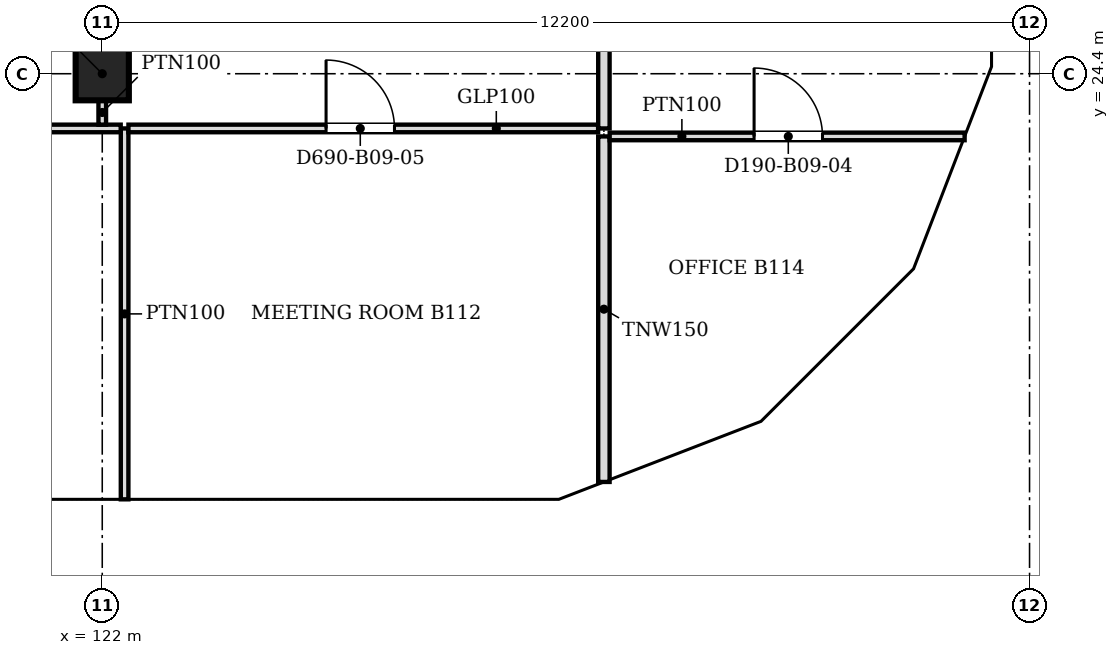
"""IFC4 building model, lengths in metres.
Left out: names, types, materials, properties, quantities, classifications, styles, units other than length and angle.
Written with IfcOpenShell. Run it as: python <this file> out.ifc"""

import sys

from ifc_helpers import new_model, si_unit, direction, frame, frame_2d, origin, origin_2d, place, context, subcontext, project, spatial, polyline, rectangle, outline, extrude, faceted_brep, source, transform, mapped, element, fill, save


model = new_model("IFC4")
c1 = context("Model", 3, precision=1e-05, world=origin(), true_north=direction((0.0, 1.0)))
c2 = subcontext(c1, "Body", "Model", "MODEL_VIEW")
j1 = project(units=[si_unit("LENGTHUNIT", "METRE"), si_unit("PLANEANGLEUNIT", "RADIAN")], contexts=[c1])
p1 = place(None, origin())
s1 = spatial("IfcSite", under=j1, at=p1, CompositionType="ELEMENT")
p2 = place(p1, origin())
s2 = spatial("IfcBuilding", under=s1, at=p2, CompositionType="ELEMENT")
p3 = place(p2, frame((0.0, 0.0, 87.6)))
s3 = spatial("IfcBuildingStorey", under=s2, at=p3, CompositionType="ELEMENT", Elevation=87.6)
p4 = place(p3, frame((122.0, 24.4, 0.0), z_axis=(0.0, 0.0, 1.0), x_axis=(1.0, 0.0, 0.0)))
e1 = element("IfcColumn", 1, at=p4, inside=s3, PredefinedType="COLUMN", context=c2, shape_type="SweptSolid", body=[
    extrude(rectangle(XDim=0.7, YDim=0.7, at=origin_2d()), origin(), (0.0, 0.0, 1.0), 3.6),
])
m1 = source(origin(), c2, "Body", "SweptSolid", [
    extrude(outline(polyline([(3.05, 0.0), (6.1, 3.8), (3.05, 7.6), (0.0, 3.8), (3.05, 0.0)])), frame((0.0, 0.25, 0.0), z_axis=(0.0, -1.0, 0.0), x_axis=(1.0, 0.0, 0.0)), (0.0, 0.0, 1.0), 0.5),
])
p5 = place(p3, frame((115.9, 18.55, -3.8), z_axis=(0.0, 0.0, 1.0), x_axis=(1.0, 0.0, 0.0)))
e2 = element("IfcWall", 2, at=p5, inside=s3, PredefinedType="SOLIDWALL", context=c2, shape_type="MappedRepresentation", body=[
    mapped(m1, transform((0.0, 0.0, 0.0), scale=1.0)),
])
m2 = source(origin(), c2, "Body", "SweptSolid", [
    extrude(outline(polyline([(3.05, 0.399), (5.78, 3.8), (3.05, 7.2), (0.321, 3.8), (3.05, 0.399)])), frame((0.0, 0.26, 0.0), z_axis=(0.0, -1.0, 0.0), x_axis=(1.0, 0.0, 0.0)), (0.0, 0.0, 1.0), 0.52),
])
p6 = place(p5, origin())
e3 = element("IfcOpeningElement", 3, at=p6, cuts=e2, PredefinedType="OPENING", context=c2, shape_type="MappedRepresentation", body=[
    mapped(m2, transform((0.0, 0.0, 0.0), scale=1.0)),
])
m3 = source(origin(), c2, "Body", "Brep", [
    faceted_brep([(3.05, -0.25, 0.0), (6.053, -0.25, 3.8), (3.05, -0.25, 7.6), (0.0, -0.25, 3.8), (0.0, 0.25, 3.8), (3.05, 0.25, 7.6), (6.007, 0.25, 3.859), (6.007, 0.25, 3.741), (3.05, 0.25, 0.0), (6.053, 0.0, 3.8)], [[[0, 1, 2, 3]], [[4, 5, 6, 7, 8]], [[8, 7, 9, 1, 0]], [[6, 5, 2, 1, 9]], [[5, 4, 3, 2]], [[4, 8, 0, 3]], [[7, 6, 9]]]),
])
p7 = place(p3, frame((122.0, 18.55, -3.8), z_axis=(0.0, 0.0, 1.0), x_axis=(1.0, 0.0, 0.0)))
e4 = element("IfcWall", 4, at=p7, inside=s3, PredefinedType="SOLIDWALL", context=c2, shape_type="MappedRepresentation", body=[
    mapped(m3, transform((0.0, 0.0, 0.0), scale=1.0)),
])
m4 = source(origin(), c2, "Body", "SweptSolid", [
    extrude(outline(polyline([(3.049, 0.401), (5.735, 3.8), (3.049, 7.199), (0.321, 3.8), (3.049, 0.401)])), frame((0.0, 0.26, 0.0), z_axis=(0.0, -1.0, 0.0), x_axis=(1.0, 0.0, 0.0)), (0.0, 0.0, 1.0), 0.52),
])
p8 = place(p7, origin())
e5 = element("IfcOpeningElement", 5, at=p8, cuts=e4, PredefinedType="OPENING", context=c2, shape_type="MappedRepresentation", body=[
    mapped(m4, transform((0.0, 0.0, 0.0), scale=1.0)),
])
m5 = source(origin(), c2, "Body", "Brep", [
    faceted_brep([(2.95, -0.25, 0.0), (3.003, -0.25, 0.068), (3.003, -0.25, 7.531), (2.95, -0.25, 7.6), (0.0, -0.25, 3.8), (0.047, 0.25, 3.86), (2.898, 0.25, 7.532), (2.898, 0.25, 0.068), (0.047, 0.25, 3.74), (2.95, 0.0, 0.0), (2.95, 0.0, 7.6), (0.0, 0.0, 3.8)], [[[0, 1, 2, 3, 4]], [[5, 6, 7, 8]], [[1, 0, 9]], [[10, 3, 2]], [[6, 5, 11, 4, 3, 10]], [[8, 7, 9, 0, 4, 11]], [[8, 11, 5]], [[1, 9, 7, 6, 10, 2]]]),
])
p9 = place(p3, frame((128.053, 18.55, -3.8), z_axis=(0.0, 0.0, 1.0), x_axis=(0.933007896601, 0.359855894603, 0.0)))
e6 = element("IfcWall", 6, at=p9, inside=s3, PredefinedType="SOLIDWALL", context=c2, shape_type="MappedRepresentation", body=[
    mapped(m5, transform((0.0, 0.0, 0.0), scale=1.0)),
])
m6 = source(origin(), c2, "Body", "SweptSolid", [
    extrude(outline(polyline([(2.75, 6.935), (0.316, 3.8), (2.75, 0.665), (2.75, 6.935)])), frame((0.0, 0.26, 0.0), z_axis=(0.0, -1.0, 0.0), x_axis=(1.0, 0.0, 0.0)), (0.0, 0.0, 1.0), 0.52),
])
p10 = place(p9, origin())
e7 = element("IfcOpeningElement", 7, at=p10, cuts=e6, PredefinedType="OPENING", context=c2, shape_type="MappedRepresentation", body=[
    mapped(m6, transform((0.0, 0.0, 0.0), scale=1.0)),
])
m7 = source(origin(), c2, "Body", "Brep", [
    faceted_brep([(0.053, -0.25, 0.0), (2.997, -0.25, 3.8), (0.053, -0.25, 7.6), (0.0, -0.25, 7.532), (0.0, -0.25, 0.068), (0.106, 0.25, 7.531), (2.944, 0.25, 3.868), (2.944, 0.25, 3.732), (0.106, 0.25, 0.068), (2.997, 0.0, 3.8), (0.053, 0.0, 0.0), (0.053, 0.0, 7.6)], [[[0, 1, 2, 3, 4]], [[5, 6, 7, 8]], [[8, 7, 9, 1, 0, 10]], [[6, 5, 11, 2, 1, 9]], [[3, 2, 11]], [[10, 0, 4]], [[8, 10, 4, 3, 11, 5]], [[7, 6, 9]]]),
])
p11 = place(p3, frame((130.769, 19.574, -3.8), z_axis=(0.0, 0.0, 1.0), x_axis=(0.707106781187, 0.707106781187, 0.0)))
e8 = element("IfcWall", 8, at=p11, inside=s3, PredefinedType="SOLIDWALL", context=c2, shape_type="MappedRepresentation", body=[
    mapped(m7, transform((0.0, 0.0, 0.0), scale=1.0)),
])
m8 = source(origin(), c2, "Body", "SweptSolid", [
    extrude(outline(polyline([(0.253, 0.666), (2.681, 3.8), (0.253, 6.934), (0.253, 0.666)])), frame((0.0, 0.26, 0.0), z_axis=(0.0, -1.0, 0.0), x_axis=(1.0, 0.0, 0.0)), (0.0, 0.0, 1.0), 0.52),
])
p12 = place(p11, origin())
e9 = element("IfcOpeningElement", 9, at=p12, cuts=e8, PredefinedType="OPENING", context=c2, shape_type="MappedRepresentation", body=[
    mapped(m8, transform((0.0, 0.0, 0.0), scale=1.0)),
])
m9 = source(origin(), c2, "Body", "Brep", [
    faceted_brep([(2.95, -0.25, 0.0), (2.997, -0.25, 0.059), (2.997, -0.25, 7.541), (2.95, -0.25, 7.6), (0.0, -0.25, 3.8), (0.053, 0.25, 3.868), (2.904, 0.25, 7.54), (2.904, 0.25, 0.06), (0.053, 0.25, 3.732), (2.95, 0.0, 0.0), (2.95, 0.0, 7.6), (0.0, 0.0, 3.8)], [[[0, 1, 2, 3, 4]], [[5, 6, 7, 8]], [[1, 0, 9]], [[10, 3, 2]], [[6, 5, 11, 4, 3, 10]], [[8, 7, 9, 0, 4, 11]], [[8, 11, 5]], [[1, 9, 7, 6, 10, 2]]]),
])
p13 = place(p3, frame((132.888, 21.694, -3.8), z_axis=(0.0, 0.0, 1.0), x_axis=(0.359901446078, 0.932990326376, 0.0)))
e10 = element("IfcWall", 10, at=p13, inside=s3, PredefinedType="SOLIDWALL", context=c2, shape_type="MappedRepresentation", body=[
    mapped(m9, transform((0.0, 0.0, 0.0), scale=1.0)),
])
p14 = place(p13, origin())
e11 = element("IfcOpeningElement", 11, at=p14, cuts=e10, PredefinedType="OPENING", context=c2, shape_type="MappedRepresentation", body=[
    mapped(m6, transform((0.0, 0.0, 0.0), scale=1.0)),
])
m10 = source(origin(), c2, "Body", "Brep", [
    faceted_brep([(0.047, -0.25, 0.0), (3.05, -0.25, 3.8), (0.047, -0.25, 7.6), (0.0, -0.25, 7.54), (0.0, -0.25, 0.06), (0.093, 0.25, 7.541), (3.05, 0.25, 3.8), (0.093, 0.25, 0.059), (0.047, 0.0, 0.0), (0.047, 0.0, 7.6)], [[[0, 1, 2, 3, 4]], [[5, 6, 7]], [[7, 6, 1, 0, 8]], [[6, 5, 9, 2, 1]], [[3, 2, 9]], [[8, 0, 4]], [[7, 8, 4, 3, 9, 5]]]),
])
p15 = place(p3, frame((133.95, 24.4, -3.8), z_axis=(0.0, 0.0, 1.0), x_axis=(0.0, 1.0, 0.0)))
e12 = element("IfcWall", 12, at=p15, inside=s3, PredefinedType="SOLIDWALL", context=c2, shape_type="MappedRepresentation", body=[
    mapped(m10, transform((0.0, 0.0, 0.0), scale=1.0)),
])
m11 = source(origin(), c2, "Body", "SweptSolid", [
    extrude(outline(polyline([(0.247, 0.656), (2.731, 3.8), (0.247, 6.944), (0.247, 0.656)])), frame((0.0, 0.26, 0.0), z_axis=(0.0, -1.0, 0.0), x_axis=(1.0, 0.0, 0.0)), (0.0, 0.0, 1.0), 0.52),
])
p16 = place(p15, origin())
e13 = element("IfcOpeningElement", 13, at=p16, cuts=e12, PredefinedType="OPENING", context=c2, shape_type="MappedRepresentation", body=[
    mapped(m11, transform((0.0, 0.0, 0.0), scale=1.0)),
])
p17 = place(p2, frame((0.0, 0.0, 91.4)))
s4 = spatial("IfcBuildingStorey", under=s2, at=p17, CompositionType="ELEMENT", Elevation=91.4)
m12 = source(origin(), c2, "Body", "SweptSolid", [
    extrude(outline(polyline([(3.05, 0.0), (6.1, 3.8), (3.05, 7.6), (0.0, 3.8), (3.05, 0.0)])), frame((0.0, 0.25, 0.0), z_axis=(0.0, -1.0, 0.0), x_axis=(1.0, 0.0, 0.0)), (0.0, 0.0, 1.0), 0.5),
])
p18 = place(p17, frame((118.95, 18.55, -3.8), z_axis=(0.0, 0.0, 1.0), x_axis=(1.0, 0.0, 0.0)))
e14 = element("IfcWall", 14, at=p18, inside=s4, PredefinedType="SOLIDWALL", context=c2, shape_type="MappedRepresentation", body=[
    mapped(m12, transform((0.0, 0.0, 0.0), scale=1.0)),
])
m13 = source(origin(), c2, "Body", "SweptSolid", [
    extrude(outline(polyline([(3.05, 0.399), (5.78, 3.8), (3.05, 7.2), (0.321, 3.8), (3.05, 0.399)])), frame((0.0, 0.26, 0.0), z_axis=(0.0, -1.0, 0.0), x_axis=(1.0, 0.0, 0.0)), (0.0, 0.0, 1.0), 0.52),
])
p19 = place(p18, origin())
e15 = element("IfcOpeningElement", 15, at=p19, cuts=e14, PredefinedType="OPENING", context=c2, shape_type="MappedRepresentation", body=[
    mapped(m13, transform((0.0, 0.0, 0.0), scale=1.0)),
])
m14 = source(origin(), c2, "Body", "Brep", [
    faceted_brep([(3.003, -0.25, 0.0), (3.05, -0.25, 0.06), (3.05, -0.25, 7.54), (3.003, -0.25, 7.6), (0.0, -0.25, 3.8), (0.0, 0.25, 3.8), (2.957, 0.25, 7.541), (2.957, 0.25, 0.059), (3.003, 0.0, 0.0), (3.003, 0.0, 7.6)], [[[0, 1, 2, 3, 4]], [[5, 6, 7]], [[1, 0, 8]], [[9, 3, 2]], [[6, 5, 4, 3, 9]], [[5, 7, 8, 0, 4]], [[1, 8, 7, 6, 9, 2]]]),
])
p20 = place(p17, frame((125.05, 18.55, -3.8), z_axis=(0.0, 0.0, 1.0), x_axis=(1.0, 0.0, 0.0)))
e16 = element("IfcWall", 16, at=p20, inside=s4, PredefinedType="SOLIDWALL", context=c2, shape_type="MappedRepresentation", body=[
    mapped(m14, transform((0.0, 0.0, 0.0), scale=1.0)),
])
m15 = source(origin(), c2, "Body", "SweptSolid", [
    extrude(outline(polyline([(2.803, 6.944), (0.319, 3.8), (2.803, 0.656), (2.803, 6.944)])), frame((0.0, 0.26, 0.0), z_axis=(0.0, -1.0, 0.0), x_axis=(1.0, 0.0, 0.0)), (0.0, 0.0, 1.0), 0.52),
])
p21 = place(p20, origin())
e17 = element("IfcOpeningElement", 17, at=p21, cuts=e16, PredefinedType="OPENING", context=c2, shape_type="MappedRepresentation", body=[
    mapped(m15, transform((0.0, 0.0, 0.0), scale=1.0)),
])
m16 = source(origin(), c2, "Body", "Brep", [
    faceted_brep([(0.047, -0.25, 0.0), (2.997, -0.25, 3.8), (0.047, -0.25, 7.6), (0.0, -0.25, 7.541), (0.0, -0.25, 0.059), (0.093, 0.25, 7.54), (2.944, 0.25, 3.868), (2.944, 0.25, 3.732), (0.093, 0.25, 0.06), (2.997, 0.0, 3.8), (0.047, 0.0, 0.0), (0.047, 0.0, 7.6)], [[[0, 1, 2, 3, 4]], [[5, 6, 7, 8]], [[8, 7, 9, 1, 0, 10]], [[6, 5, 11, 2, 1, 9]], [[3, 2, 11]], [[10, 0, 4]], [[8, 10, 4, 3, 11, 5]], [[9, 7, 6]]]),
])
p22 = place(p17, frame((128.01, 18.533, -3.8), z_axis=(0.0, 0.0, 1.0), x_axis=(0.932990326376, 0.359901446078, 0.0)))
e18 = element("IfcWall", 18, at=p22, inside=s4, PredefinedType="SOLIDWALL", context=c2, shape_type="MappedRepresentation", body=[
    mapped(m16, transform((0.0, 0.0, 0.0), scale=1.0)),
])
m17 = source(origin(), c2, "Body", "SweptSolid", [
    extrude(outline(polyline([(0.247, 0.665), (2.681, 3.8), (0.247, 6.935), (0.247, 0.665)])), frame((0.0, 0.26, 0.0), z_axis=(0.0, -1.0, 0.0), x_axis=(1.0, 0.0, 0.0)), (0.0, 0.0, 1.0), 0.52),
])
p23 = place(p22, origin())
e19 = element("IfcOpeningElement", 19, at=p23, cuts=e18, PredefinedType="OPENING", context=c2, shape_type="MappedRepresentation", body=[
    mapped(m17, transform((0.0, 0.0, 0.0), scale=1.0)),
])
m18 = source(origin(), c2, "Body", "Brep", [
    faceted_brep([(2.944, -0.25, 0.0), (2.997, -0.25, 0.068), (2.997, -0.25, 7.532), (2.944, -0.25, 7.6), (0.0, -0.25, 3.8), (0.053, 0.25, 3.868), (2.891, 0.25, 7.532), (2.891, 0.25, 0.068), (0.053, 0.25, 3.731), (2.944, 0.0, 0.0), (2.944, 0.0, 7.6), (0.0, 0.0, 3.8)], [[[0, 1, 2, 3, 4]], [[5, 6, 7, 8]], [[1, 0, 9]], [[10, 3, 2]], [[6, 5, 11, 4, 3, 10]], [[8, 7, 9, 0, 4, 11]], [[8, 11, 5]], [[1, 9, 7, 6, 10, 2]]]),
])
p24 = place(p17, frame((130.806, 19.612, -3.8), z_axis=(0.0, 0.0, 1.0), x_axis=(0.707106781187, 0.707106781187, 0.0)))
e20 = element("IfcWall", 20, at=p24, inside=s4, PredefinedType="SOLIDWALL", context=c2, shape_type="MappedRepresentation", body=[
    mapped(m18, transform((0.0, 0.0, 0.0), scale=1.0)),
])
m19 = source(origin(), c2, "Body", "SweptSolid", [
    extrude(outline(polyline([(2.744, 6.934), (0.316, 3.8), (2.744, 0.666), (2.744, 6.934)])), frame((0.0, 0.26, 0.0), z_axis=(0.0, -1.0, 0.0), x_axis=(1.0, 0.0, 0.0)), (0.0, 0.0, 1.0), 0.52),
])
p25 = place(p24, origin())
e21 = element("IfcOpeningElement", 21, at=p25, cuts=e20, PredefinedType="OPENING", context=c2, shape_type="MappedRepresentation", body=[
    mapped(m19, transform((0.0, 0.0, 0.0), scale=1.0)),
])
m20 = source(origin(), c2, "Body", "Brep", [
    faceted_brep([(0.053, -0.25, 0.0), (3.003, -0.25, 3.8), (0.053, -0.25, 7.6), (0.0, -0.25, 7.531), (0.0, -0.25, 0.068), (0.106, 0.25, 7.532), (2.957, 0.25, 3.86), (2.957, 0.25, 3.74), (0.106, 0.25, 0.068), (3.003, 0.0, 3.8), (0.053, 0.0, 0.0), (0.053, 0.0, 7.6)], [[[0, 1, 2, 3, 4]], [[5, 6, 7, 8]], [[8, 7, 9, 1, 0, 10]], [[6, 5, 11, 2, 1, 9]], [[3, 2, 11]], [[10, 0, 4]], [[8, 10, 4, 3, 11, 5]], [[9, 7, 6]]]),
])
p26 = place(p17, frame((132.869, 21.644, -3.8), z_axis=(0.0, 0.0, 1.0), x_axis=(0.359855894603, 0.933007896601, 0.0)))
e22 = element("IfcWall", 22, at=p26, inside=s4, PredefinedType="SOLIDWALL", context=c2, shape_type="MappedRepresentation", body=[
    mapped(m20, transform((0.0, 0.0, 0.0), scale=1.0)),
])
m21 = source(origin(), c2, "Body", "SweptSolid", [
    extrude(outline(polyline([(0.253, 0.665), (2.687, 3.8), (0.253, 6.935), (0.253, 0.665)])), frame((0.0, 0.26, 0.0), z_axis=(0.0, -1.0, 0.0), x_axis=(1.0, 0.0, 0.0)), (0.0, 0.0, 1.0), 0.52),
])
p27 = place(p26, origin())
e23 = element("IfcOpeningElement", 23, at=p27, cuts=e22, PredefinedType="OPENING", context=c2, shape_type="MappedRepresentation", body=[
    mapped(m21, transform((0.0, 0.0, 0.0), scale=1.0)),
])
m22 = source(origin(), c2, "Body", "Brep", [
    faceted_brep([(3.003, -0.25, 0.0), (6.053, -0.25, 3.8), (3.003, -0.25, 7.6), (0.0, -0.25, 3.8), (0.047, 0.25, 3.859), (3.003, 0.25, 7.6), (6.053, 0.25, 3.8), (3.003, 0.25, 0.0), (0.047, 0.25, 3.741), (0.0, 0.0, 3.8)], [[[0, 1, 2, 3]], [[4, 5, 6, 7, 8]], [[7, 6, 1, 0]], [[6, 5, 2, 1]], [[5, 4, 9, 3, 2]], [[8, 7, 0, 3, 9]], [[8, 9, 4]]]),
])
p28 = place(p17, frame((133.95, 24.447, -3.8), z_axis=(0.0, 0.0, 1.0), x_axis=(0.0, 1.0, 0.0)))
e24 = element("IfcWall", 24, at=p28, inside=s4, PredefinedType="SOLIDWALL", context=c2, shape_type="MappedRepresentation", body=[
    mapped(m22, transform((0.0, 0.0, 0.0), scale=1.0)),
])
m23 = source(origin(), c2, "Body", "SweptSolid", [
    extrude(outline(polyline([(3.005, 0.401), (5.733, 3.8), (3.005, 7.199), (0.319, 3.8), (3.005, 0.401)])), frame((0.0, 0.26, 0.0), z_axis=(0.0, -1.0, 0.0), x_axis=(1.0, 0.0, 0.0)), (0.0, 0.0, 1.0), 0.52),
])
p29 = place(p28, origin())
e25 = element("IfcOpeningElement", 25, at=p29, cuts=e24, PredefinedType="OPENING", context=c2, shape_type="MappedRepresentation", body=[
    mapped(m23, transform((0.0, 0.0, 0.0), scale=1.0)),
])
p30 = place(p3, frame((122.294, 18.8, 0.0), z_axis=(0.0, 0.0, 1.0), x_axis=(0.0, 1.0, 0.0)))
e26 = element("IfcWall", 26, at=p30, inside=s3, PredefinedType="PARTITIONING", context=c2, shape_type="SweptSolid", body=[
    extrude(rectangle(XDim=4.88, YDim=0.1, at=frame_2d((2.44, 0.0))), origin(), (0.0, 0.0, 1.0), 3.067),
])
p31 = place(p3, frame((128.6, 19.029, 0.0), z_axis=(0.0, 0.0, 1.0), x_axis=(0.0, 1.0, 0.0)))
e27 = element("IfcWall", 27, at=p31, inside=s3, PredefinedType="PARTITIONING", context=c2, shape_type="SweptSolid", body=[
    extrude(rectangle(XDim=4.546, YDim=0.15, at=frame_2d((2.273, 0.0))), origin(), (0.0, 0.0, 1.0), 3.067),
])
p32 = place(p3, frame((133.346, 23.575, 0.0), z_axis=(0.0, 0.0, 1.0), x_axis=(-1.0, 0.0, 0.0)))
e28 = element("IfcWall", 28, at=p32, inside=s3, PredefinedType="PARTITIONING", context=c2, shape_type="SweptSolid", body=[
    extrude(rectangle(XDim=4.67, YDim=0.1, at=frame_2d((2.335, 0.0))), origin(), (0.0, 0.0, 1.0), 3.067),
])
m24 = source(origin(), c2, "Body", "SweptSolid", [
    extrude(rectangle(XDim=0.9, YDim=2.1, at=frame_2d((0.45, 1.05))), frame((0.0, 0.06, 0.0), z_axis=(0.0, -1.0, 0.0), x_axis=(1.0, 0.0, 0.0)), (0.0, 0.0, 1.0), 0.12),
])
p33 = place(p32, frame((1.87, 0.0, 0.0)))
e29 = element("IfcOpeningElement", 29, at=p33, cuts=e28, PredefinedType="OPENING", context=c2, shape_type="MappedRepresentation", body=[
    mapped(m24, transform((0.0, 0.0, 0.0), scale=1.0)),
])
p34 = place(p3, frame((122.243, 23.68, 0.0), z_axis=(0.0, 0.0, 1.0), x_axis=(-1.0, 0.0, 0.0)))
e30 = element("IfcWall", 30, at=p34, inside=s3, PredefinedType="PARTITIONING", context=c2, shape_type="SweptSolid", body=[
    extrude(rectangle(XDim=5.767, YDim=0.1, at=frame_2d((2.883, 0.0))), origin(), (0.0, 0.0, 1.0), 3.067),
])
p35 = place(p34, frame((2.467, 0.0, 0.0)))
e31 = element("IfcOpeningElement", 31, at=p35, cuts=e30, PredefinedType="OPENING", context=c2, shape_type="MappedRepresentation", body=[
    mapped(m24, transform((0.0, 0.0, 0.0), scale=1.0)),
])
p36 = place(p3, frame((128.524, 23.68, 0.0), z_axis=(0.0, 0.0, 1.0), x_axis=(-1.0, 0.0, 0.0)))
e32 = element("IfcWall", 32, at=p36, inside=s3, PredefinedType="PARTITIONING", context=c2, shape_type="SweptSolid", body=[
    extrude(rectangle(XDim=6.179, YDim=0.1, at=frame_2d((3.09, 0.0))), origin(), (0.0, 0.0, 1.0), 3.067),
])
p37 = place(p36, frame((2.679, 0.0, 0.0)))
e33 = element("IfcOpeningElement", 33, at=p37, cuts=e32, PredefinedType="OPENING", context=c2, shape_type="MappedRepresentation", body=[
    mapped(m24, transform((0.0, 0.0, 0.0), scale=1.0)),
])
p38 = place(p3, frame((128.6, 23.68, 0.0), z_axis=(0.0, 0.0, 1.0), x_axis=(0.0, 1.0, 0.0)))
e34 = element("IfcWall", 34, at=p38, inside=s3, PredefinedType="PARTITIONING", context=c2, shape_type="SweptSolid", body=[
    extrude(rectangle(XDim=9.844, YDim=0.15, at=frame_2d((4.922, 0.0))), origin(), (0.0, 0.0, 1.0), 3.067),
])
p39 = place(p3, frame((122.0, 24.05, 0.0), z_axis=(0.0, 0.0, 1.0), x_axis=(0.0, -1.0, 0.0)))
e35 = element("IfcWall", 35, at=p39, inside=s3, PredefinedType="PARTITIONING", context=c2, shape_type="SweptSolid", body=[
    extrude(rectangle(XDim=0.32, YDim=0.1, at=frame_2d((0.16, 0.0))), origin(), (0.0, 0.0, 1.0), 3.067),
])
m25 = source(origin(), c2, "Body", "SweptSolid", [
    extrude(rectangle(XDim=0.9, YDim=2.1, at=frame_2d((0.45, 1.05))), frame((0.0, 0.025, 0.0), z_axis=(0.0, -1.0, 0.0), x_axis=(1.0, 0.0, 0.0)), (0.0, 0.0, 1.0), 0.05),
])
p40 = place(p33, origin())
e36 = element("IfcDoor", 36, at=p40, inside=s3, OperationType="SINGLE_SWING_RIGHT", PredefinedType="DOOR", context=c2, shape_type="MappedRepresentation", body=[
    mapped(m25, transform((0.0, 0.0, 0.0), scale=1.0)),
])
fill(e29, e36)
p41 = place(p37, origin())
e37 = element("IfcDoor", 37, at=p41, inside=s3, OperationType="SINGLE_SWING_RIGHT", PredefinedType="DOOR", context=c2, shape_type="MappedRepresentation", body=[
    mapped(m25, transform((0.0, 0.0, 0.0), scale=1.0)),
])
fill(e33, e37)
save(model, sys.argv[1])
